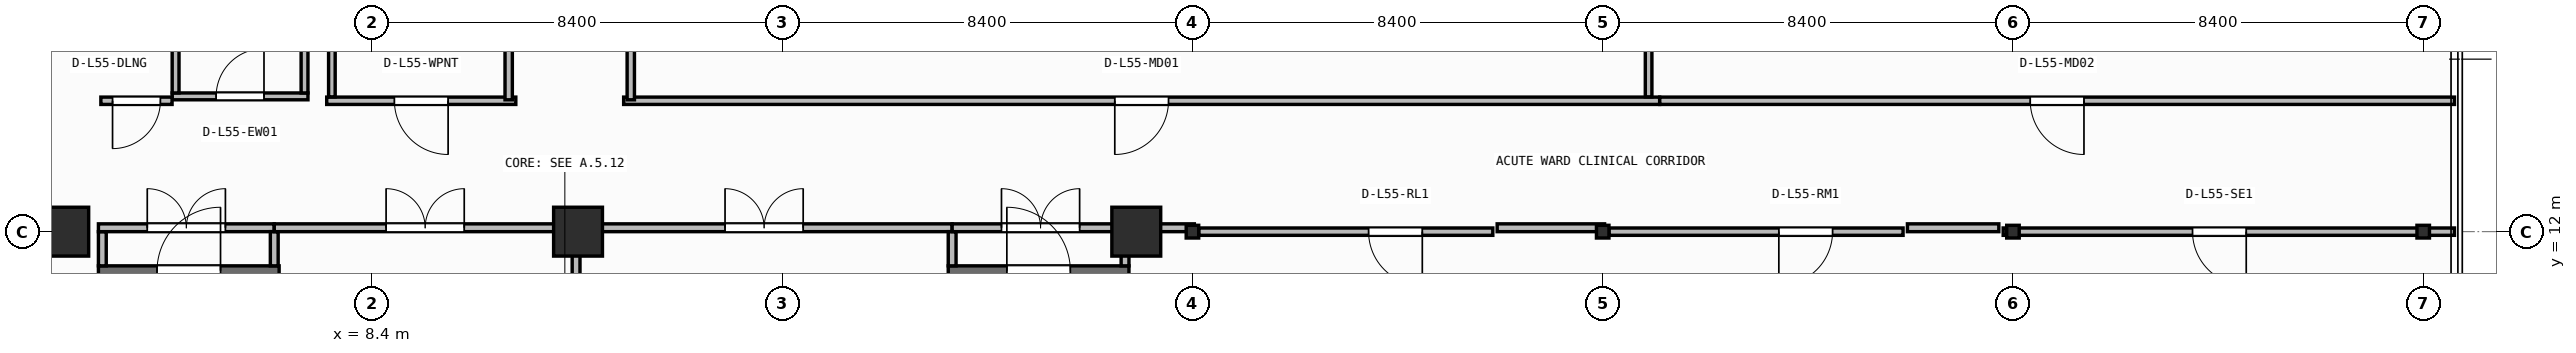
"""IFC4 building model, lengths in metres.
Left out: names, types, materials, properties, quantities, classifications, styles, units other than length and angle.
Written with IfcOpenShell. Run it as: python <this file> out.ifc"""

import sys

from ifc_helpers import new_model, si_unit, direction, frame, frame_2d, origin, origin_2d, place, context, subcontext, project, spatial, rectangle, i_section, extrude, element, fill, save


model = new_model("IFC4")
c1 = context("Model", 3, precision=1e-05, world=origin(), true_north=direction((0.0, 1.0)))
c2 = subcontext(c1, "Body", "Model", "MODEL_VIEW")
j1 = project(units=[si_unit("LENGTHUNIT", "METRE"), si_unit("PLANEANGLEUNIT", "RADIAN")], contexts=[c1])
p1 = place(None, origin())
s1 = spatial("IfcSite", under=j1, at=p1, CompositionType="ELEMENT")
p2 = place(p1, origin())
s2 = spatial("IfcBuilding", under=s1, at=p2, CompositionType="ELEMENT")
p3 = place(p2, frame((0.0, 0.0, 223.7)))
s3 = spatial("IfcBuildingStorey", under=s2, at=p3, CompositionType="ELEMENT", Elevation=223.7)
for number, where, z_axis, x_axis in (
    (1, (2.1, 12.0, 0.0), (0.0, 0.0, 1.0), (1.0, 0.0, 0.0)),
    (2, (12.62, 12.0, 0.0), (0.0, 0.0, 1.0), (1.0, 0.0, 0.0)),
    (3, (24.05, 12.0, 0.0), (0.0, 0.0, 1.0), (1.0, 0.0, 0.0)),
):
    element("IfcColumn", number, at=place(p3, frame(where, z_axis=z_axis, x_axis=x_axis)), inside=s3, PredefinedType="COLUMN", context=c2, shape_type="SweptSolid", body=[
        extrude(rectangle(XDim=1.0, YDim=1.0, at=origin_2d()), origin(), (0.0, 0.0, 1.0), 3.95),
    ])
for number, where, z_axis, x_axis in (
    (4, (25.2, 12.0, 0.0), (0.0, 0.0, 1.0), (1.0, 0.0, 0.0)),
    (5, (33.6, 12.0, 0.0), (0.0, 0.0, 1.0), (1.0, 0.0, 0.0)),
    (6, (42.0, 12.0, 0.0), (0.0, 0.0, 1.0), (1.0, 0.0, 0.0)),
    (7, (50.4, 12.0, 0.0), (0.0, 0.0, 1.0), (1.0, 0.0, 0.0)),
):
    element("IfcColumn", number, at=place(p3, frame(where, z_axis=z_axis, x_axis=x_axis)), inside=s3, PredefinedType="COLUMN", context=c2, shape_type="SweptSolid", body=[
        extrude(i_section(OverallWidth=0.256, OverallDepth=0.26, WebThickness=0.01, FlangeThickness=0.017, FilletRadius=0.013, at=origin_2d()), origin(), (0.0, 0.0, 1.0), 3.95),
    ])
p4 = place(p3, frame((2.8, 11.2, 0.0), z_axis=(0.0, 0.0, 1.0), x_axis=(1.0, 0.0, 0.0)))
e8 = element("IfcWall", 8, at=p4, inside=s3, PredefinedType="SHEAR", context=c2, shape_type="SweptSolid", body=[
    extrude(rectangle(XDim=3.7, YDim=0.2, at=frame_2d((1.85, 0.0))), origin(), (0.0, 0.0, 1.0), 3.71),
])
p5 = place(p4, frame((1.2, 0.0, 0.0)))
e9 = element("IfcOpeningElement", 9, at=p5, cuts=e8, PredefinedType="OPENING", context=c2, shape_type="SweptSolid", body=[
    extrude(rectangle(XDim=1.3, YDim=2.15, at=frame_2d((0.65, 1.075))), frame((0.0, 0.11, 0.0), z_axis=(0.0, -1.0, 0.0), x_axis=(1.0, 0.0, 0.0)), (0.0, 0.0, 1.0), 0.22),
])
p6 = place(p3, frame((20.2, 11.2, 0.0), z_axis=(0.0, 0.0, 1.0), x_axis=(1.0, 0.0, 0.0)))
e10 = element("IfcWall", 10, at=p6, inside=s3, PredefinedType="SHEAR", context=c2, shape_type="SweptSolid", body=[
    extrude(rectangle(XDim=3.7, YDim=0.2, at=frame_2d((1.85, 0.0))), origin(), (0.0, 0.0, 1.0), 3.71),
])
p7 = place(p6, frame((1.2, 0.0, 0.0)))
e11 = element("IfcOpeningElement", 11, at=p7, cuts=e10, PredefinedType="OPENING", context=c2, shape_type="SweptSolid", body=[
    extrude(rectangle(XDim=1.3, YDim=2.15, at=frame_2d((0.65, 1.075))), frame((0.0, 0.11, 0.0), z_axis=(0.0, -1.0, 0.0), x_axis=(1.0, 0.0, 0.0)), (0.0, 0.0, 1.0), 0.22),
])
p8 = place(p3, frame((2.88, 11.3, 0.0), z_axis=(0.0, 0.0, 1.0), x_axis=(0.0, 1.0, 0.0)))
e12 = element("IfcWall", 12, at=p8, inside=s3, PredefinedType="PARTITIONING", context=c2, shape_type="SweptSolid", body=[
    extrude(rectangle(XDim=0.7, YDim=0.16, at=frame_2d((0.35, 0.0))), origin(), (0.0, 0.0, 1.0), 3.71),
])
p9 = place(p3, frame((2.8, 12.08, 0.0), z_axis=(0.0, 0.0, 1.0), x_axis=(1.0, 0.0, 0.0)))
e13 = element("IfcWall", 13, at=p9, inside=s3, PredefinedType="PARTITIONING", context=c2, shape_type="SweptSolid", body=[
    extrude(rectangle(XDim=3.6, YDim=0.16, at=frame_2d((1.8, 0.0))), origin(), (0.0, 0.0, 1.0), 3.152),
])
p10 = place(p9, frame((1.0, 0.0, 0.0)))
e14 = element("IfcOpeningElement", 14, at=p10, cuts=e13, PredefinedType="OPENING", context=c2, shape_type="SweptSolid", body=[
    extrude(rectangle(XDim=1.6, YDim=2.05, at=frame_2d((0.8, 1.025))), frame((0.0, 0.09, 0.0), z_axis=(0.0, -1.0, 0.0), x_axis=(1.0, 0.0, 0.0)), (0.0, 0.0, 1.0), 0.18),
])
p11 = place(p3, frame((6.4, 11.3, 0.0), z_axis=(0.0, 0.0, 1.0), x_axis=(0.0, 1.0, 0.0)))
e15 = element("IfcWall", 15, at=p11, inside=s3, PredefinedType="PARTITIONING", context=c2, shape_type="SweptSolid", body=[
    extrude(rectangle(XDim=0.7, YDim=0.16, at=frame_2d((0.35, 0.0))), origin(), (0.0, 0.0, 1.0), 3.71),
])
p12 = place(p3, frame((6.4, 12.08, 0.0), z_axis=(0.0, 0.0, 1.0), x_axis=(1.0, 0.0, 0.0)))
e16 = element("IfcWall", 16, at=p12, inside=s3, PredefinedType="PARTITIONING", context=c2, shape_type="SweptSolid", body=[
    extrude(rectangle(XDim=6.18, YDim=0.16, at=frame_2d((3.09, 0.0))), origin(), (0.0, 0.0, 1.0), 3.152),
])
p13 = place(p12, frame((2.29, 0.0, 0.0)))
e17 = element("IfcOpeningElement", 17, at=p13, cuts=e16, PredefinedType="OPENING", context=c2, shape_type="SweptSolid", body=[
    extrude(rectangle(XDim=1.6, YDim=2.05, at=frame_2d((0.8, 1.025))), frame((0.0, 0.09, 0.0), z_axis=(0.0, -1.0, 0.0), x_axis=(1.0, 0.0, 0.0)), (0.0, 0.0, 1.0), 0.18),
])
p14 = place(p3, frame((12.58, 9.21, 0.0), z_axis=(0.0, 0.0, 1.0), x_axis=(0.0, 1.0, 0.0)))
e18 = element("IfcWall", 18, at=p14, inside=s3, PredefinedType="PARTITIONING", context=c2, shape_type="SweptSolid", body=[
    extrude(rectangle(XDim=2.79, YDim=0.16, at=frame_2d((1.395, 0.0))), origin(), (0.0, 0.0, 1.0), 3.71),
])
p15 = place(p3, frame((12.58, 12.08, 0.0), z_axis=(0.0, 0.0, 1.0), x_axis=(1.0, 0.0, 0.0)))
e19 = element("IfcWall", 19, at=p15, inside=s3, PredefinedType="PARTITIONING", context=c2, shape_type="SweptSolid", body=[
    extrude(rectangle(XDim=7.7, YDim=0.16, at=frame_2d((3.85, 0.0))), origin(), (0.0, 0.0, 1.0), 3.152),
])
p16 = place(p15, frame((3.05, 0.0, 0.0)))
e20 = element("IfcOpeningElement", 20, at=p16, cuts=e19, PredefinedType="OPENING", context=c2, shape_type="SweptSolid", body=[
    extrude(rectangle(XDim=1.6, YDim=2.05, at=frame_2d((0.8, 1.025))), frame((0.0, 0.09, 0.0), z_axis=(0.0, -1.0, 0.0), x_axis=(1.0, 0.0, 0.0)), (0.0, 0.0, 1.0), 0.18),
])
p17 = place(p3, frame((20.28, 11.3, 0.0), z_axis=(0.0, 0.0, 1.0), x_axis=(0.0, 1.0, 0.0)))
e21 = element("IfcWall", 21, at=p17, inside=s3, PredefinedType="PARTITIONING", context=c2, shape_type="SweptSolid", body=[
    extrude(rectangle(XDim=0.7, YDim=0.16, at=frame_2d((0.35, 0.0))), origin(), (0.0, 0.0, 1.0), 3.71),
])
p18 = place(p3, frame((20.28, 12.08, 0.0), z_axis=(0.0, 0.0, 1.0), x_axis=(1.0, 0.0, 0.0)))
e22 = element("IfcWall", 22, at=p18, inside=s3, PredefinedType="PARTITIONING", context=c2, shape_type="SweptSolid", body=[
    extrude(rectangle(XDim=3.62, YDim=0.16, at=frame_2d((1.81, 0.0))), origin(), (0.0, 0.0, 1.0), 3.152),
])
p19 = place(p18, frame((1.01, 0.0, 0.0)))
e23 = element("IfcOpeningElement", 23, at=p19, cuts=e22, PredefinedType="OPENING", context=c2, shape_type="SweptSolid", body=[
    extrude(rectangle(XDim=1.6, YDim=2.05, at=frame_2d((0.8, 1.025))), frame((0.0, 0.09, 0.0), z_axis=(0.0, -1.0, 0.0), x_axis=(1.0, 0.0, 0.0)), (0.0, 0.0, 1.0), 0.18),
])
p20 = place(p3, frame((23.82, 11.3, 0.0), z_axis=(0.0, 0.0, 1.0), x_axis=(0.0, 1.0, 0.0)))
e24 = element("IfcWall", 24, at=p20, inside=s3, PredefinedType="PARTITIONING", context=c2, shape_type="SweptSolid", body=[
    extrude(rectangle(XDim=0.7, YDim=0.16, at=frame_2d((0.35, 0.0))), origin(), (0.0, 0.0, 1.0), 3.71),
])
p21 = place(p3, frame((4.31, 14.77, 0.0), z_axis=(0.0, 0.0, 1.0), x_axis=(1.0, 0.0, 0.0)))
e25 = element("IfcWall", 25, at=p21, inside=s3, PredefinedType="PARTITIONING", context=c2, shape_type="SweptSolid", body=[
    extrude(rectangle(XDim=2.78, YDim=0.14, at=frame_2d((1.39, 0.0))), origin(), (0.0, 0.0, 1.0), 3.71),
])
p22 = place(p21, frame((0.9, 0.0, 0.0)))
e26 = element("IfcOpeningElement", 26, at=p22, cuts=e25, PredefinedType="OPENING", context=c2, shape_type="SweptSolid", body=[
    extrude(rectangle(XDim=0.98, YDim=2.1, at=frame_2d((0.49, 1.05))), frame((0.0, 0.08, 0.0), z_axis=(0.0, -1.0, 0.0), x_axis=(1.0, 0.0, 0.0)), (0.0, 0.0, 1.0), 0.16),
])
for number, where, z_axis, x_axis in (
    (27, (4.38, 14.84, 0.0), (0.0, 0.0, 1.0), (0.0, 1.0, 0.0)),
    (28, (7.02, 14.84, 0.0), (0.0, 0.0, 1.0), (0.0, 1.0, 0.0)),
):
    element("IfcWall", number, at=place(p3, frame(where, z_axis=z_axis, x_axis=x_axis)), inside=s3, PredefinedType="PARTITIONING", context=c2, shape_type="SweptSolid", body=[
        extrude(rectangle(XDim=2.2, YDim=0.14, at=frame_2d((1.1, 0.0))), origin(), (0.0, 0.0, 1.0), 3.71),
    ])
p23 = place(p3, frame((31.35, 12.0, 0.0), z_axis=(0.0, 0.0, 1.0), x_axis=(-1.0, 0.0, 0.0)))
e29 = element("IfcWall", 29, at=p23, inside=s3, PredefinedType="PARTITIONING", context=c2, shape_type="SweptSolid", body=[
    extrude(rectangle(XDim=6.022, YDim=0.15, at=frame_2d((3.011, 0.0))), origin(), (0.0, 0.0, 1.0), 3.152),
])
p24 = place(p23, frame((1.444, 0.0, 0.0)))
e30 = element("IfcOpeningElement", 30, at=p24, cuts=e29, PredefinedType="OPENING", context=c2, shape_type="SweptSolid", body=[
    extrude(rectangle(XDim=1.1, YDim=2.1, at=frame_2d((0.55, 1.05))), frame((0.0, 0.085, 0.0), z_axis=(0.0, -1.0, 0.0), x_axis=(1.0, 0.0, 0.0)), (0.0, 0.0, 1.0), 0.17),
])
p25 = place(p3, frame((39.75, 12.0, 0.0), z_axis=(0.0, 0.0, 1.0), x_axis=(-1.0, 0.0, 0.0)))
e31 = element("IfcWall", 31, at=p25, inside=s3, PredefinedType="PARTITIONING", context=c2, shape_type="SweptSolid", body=[
    extrude(rectangle(XDim=6.022, YDim=0.15, at=frame_2d((3.011, 0.0))), origin(), (0.0, 0.0, 1.0), 3.152),
])
p26 = place(p25, frame((1.444, 0.0, 0.0)))
e32 = element("IfcOpeningElement", 32, at=p26, cuts=e31, PredefinedType="OPENING", context=c2, shape_type="SweptSolid", body=[
    extrude(rectangle(XDim=1.1, YDim=2.1, at=frame_2d((0.55, 1.05))), frame((0.0, 0.085, 0.0), z_axis=(0.0, -1.0, 0.0), x_axis=(1.0, 0.0, 0.0)), (0.0, 0.0, 1.0), 0.17),
])
p27 = place(p3, frame((51.04, 12.0, 0.0), z_axis=(0.0, 0.0, 1.0), x_axis=(-1.0, 0.0, 0.0)))
e33 = element("IfcWall", 33, at=p27, inside=s3, PredefinedType="PARTITIONING", context=c2, shape_type="SweptSolid", body=[
    extrude(rectangle(XDim=9.24, YDim=0.15, at=frame_2d((4.62, 0.0))), origin(), (0.0, 0.0, 1.0), 3.152),
])
p28 = place(p27, frame((4.263, 0.0, 0.0)))
e34 = element("IfcOpeningElement", 34, at=p28, cuts=e33, PredefinedType="OPENING", context=c2, shape_type="SweptSolid", body=[
    extrude(rectangle(XDim=1.1, YDim=2.1, at=frame_2d((0.55, 1.05))), frame((0.0, 0.085, 0.0), z_axis=(0.0, -1.0, 0.0), x_axis=(1.0, 0.0, 0.0)), (0.0, 0.0, 1.0), 0.17),
])
p29 = place(p3, frame((4.308, 14.68, 0.0), z_axis=(0.0, 0.0, 1.0), x_axis=(-1.0, 0.0, 0.0)))
e35 = element("IfcWall", 35, at=p29, inside=s3, PredefinedType="PARTITIONING", context=c2, shape_type="SweptSolid", body=[
    extrude(rectangle(XDim=1.458, YDim=0.15, at=frame_2d((0.729, 0.0))), origin(), (0.0, 0.0, 1.0), 3.71),
])
p30 = place(p29, frame((0.239, 0.0, 0.0)))
e36 = element("IfcOpeningElement", 36, at=p30, cuts=e35, PredefinedType="OPENING", context=c2, shape_type="SweptSolid", body=[
    extrude(rectangle(XDim=0.98, YDim=2.1, at=frame_2d((0.49, 1.05))), frame((0.0, 0.085, 0.0), z_axis=(0.0, -1.0, 0.0), x_axis=(1.0, 0.0, 0.0)), (0.0, 0.0, 1.0), 0.17),
])
p31 = place(p3, frame((11.346, 14.68, 0.0), z_axis=(0.0, 0.0, 1.0), x_axis=(-1.0, 0.0, 0.0)))
e37 = element("IfcWall", 37, at=p31, inside=s3, PredefinedType="PARTITIONING", context=c2, shape_type="SweptSolid", body=[
    extrude(rectangle(XDim=3.872, YDim=0.15, at=frame_2d((1.936, 0.0))), origin(), (0.0, 0.0, 1.0), 3.71),
])
p32 = place(p31, frame((1.386, 0.0, 0.0)))
e38 = element("IfcOpeningElement", 38, at=p32, cuts=e37, PredefinedType="OPENING", context=c2, shape_type="SweptSolid", body=[
    extrude(rectangle(XDim=1.1, YDim=2.1, at=frame_2d((0.55, 1.05))), frame((0.0, 0.085, 0.0), z_axis=(0.0, -1.0, 0.0), x_axis=(1.0, 0.0, 0.0)), (0.0, 0.0, 1.0), 0.17),
])
p33 = place(p3, frame((34.766, 14.68, 0.0), z_axis=(0.0, 0.0, 1.0), x_axis=(-1.0, 0.0, 0.0)))
e39 = element("IfcWall", 39, at=p33, inside=s3, PredefinedType="PARTITIONING", context=c2, shape_type="SweptSolid", body=[
    extrude(rectangle(XDim=21.212, YDim=0.15, at=frame_2d((10.606, 0.0))), origin(), (0.0, 0.0, 1.0), 3.71),
])
p34 = place(p33, frame((10.056, 0.0, 0.0)))
e40 = element("IfcOpeningElement", 40, at=p34, cuts=e39, PredefinedType="OPENING", context=c2, shape_type="SweptSolid", body=[
    extrude(rectangle(XDim=1.1, YDim=2.1, at=frame_2d((0.55, 1.05))), frame((0.0, 0.085, 0.0), z_axis=(0.0, -1.0, 0.0), x_axis=(1.0, 0.0, 0.0)), (0.0, 0.0, 1.0), 0.17),
])
p35 = place(p3, frame((51.04, 14.68, 0.0), z_axis=(0.0, 0.0, 1.0), x_axis=(-1.0, 0.0, 0.0)))
e41 = element("IfcWall", 41, at=p35, inside=s3, PredefinedType="PARTITIONING", context=c2, shape_type="SweptSolid", body=[
    extrude(rectangle(XDim=16.272, YDim=0.15, at=frame_2d((8.136, 0.0))), origin(), (0.0, 0.0, 1.0), 3.71),
])
p36 = place(p35, frame((7.586, 0.0, 0.0)))
e42 = element("IfcOpeningElement", 42, at=p36, cuts=e41, PredefinedType="OPENING", context=c2, shape_type="SweptSolid", body=[
    extrude(rectangle(XDim=1.1, YDim=2.1, at=frame_2d((0.55, 1.05))), frame((0.0, 0.085, 0.0), z_axis=(0.0, -1.0, 0.0), x_axis=(1.0, 0.0, 0.0)), (0.0, 0.0, 1.0), 0.17),
])
p37 = place(p3, frame((11.2, 26.6, 0.0), z_axis=(0.0, 0.0, 1.0), x_axis=(0.0, -1.0, 0.0)))
e43 = element("IfcWall", 43, at=p37, inside=s3, PredefinedType="PARTITIONING", context=c2, shape_type="SweptSolid", body=[
    extrude(rectangle(XDim=11.9, YDim=0.15, at=frame_2d((5.95, 0.0))), origin(), (0.0, 0.0, 1.0), 3.71),
])
p38 = place(p3, frame((13.7, 14.7, 0.0), z_axis=(0.0, 0.0, 1.0), x_axis=(0.0, 1.0, 0.0)))
e44 = element("IfcWall", 44, at=p38, inside=s3, PredefinedType="PARTITIONING", context=c2, shape_type="SweptSolid", body=[
    extrude(rectangle(XDim=5.326, YDim=0.15, at=frame_2d((2.663, 0.0))), origin(), (0.0, 0.0, 1.0), 3.71),
])
p39 = place(p3, frame((7.58, 14.76, 0.0), z_axis=(0.0, 0.0, 1.0), x_axis=(0.0, 1.0, 0.0)))
e45 = element("IfcWall", 45, at=p39, inside=s3, PredefinedType="PARTITIONING", context=c2, shape_type="SweptSolid", body=[
    extrude(rectangle(XDim=11.76, YDim=0.135, at=frame_2d((5.88, 0.0))), origin(), (0.0, 0.0, 1.0), 3.71),
])
p40 = place(p3, frame((34.54, 14.76, 0.0), z_axis=(0.0, 0.0, 1.0), x_axis=(0.0, 1.0, 0.0)))
e46 = element("IfcWall", 46, at=p40, inside=s3, PredefinedType="PARTITIONING", context=c2, shape_type="SweptSolid", body=[
    extrude(rectangle(XDim=5.04, YDim=0.135, at=frame_2d((2.52, 0.0))), origin(), (0.0, 0.0, 1.0), 3.71),
])
p41 = place(p3, frame((24.02, 12.08, 0.0), z_axis=(0.0, 0.0, 1.0), x_axis=(1.0, 0.0, 0.0)))
e47 = element("IfcWall", 47, at=p41, inside=s3, PredefinedType="PARTITIONING", context=c2, shape_type="SweptSolid", body=[
    extrude(rectangle(XDim=1.219, YDim=0.16, at=frame_2d((0.609, 0.0))), origin(), (0.0, 0.0, 1.0), 3.152),
])
p42 = place(p3, frame((31.439, 12.08, 0.0), z_axis=(0.0, 0.0, 1.0), x_axis=(1.0, 0.0, 0.0)))
e48 = element("IfcWall", 48, at=p42, inside=s3, PredefinedType="PARTITIONING", context=c2, shape_type="SweptSolid", body=[
    extrude(rectangle(XDim=2.199, YDim=0.16, at=frame_2d((1.1, 0.0))), origin(), (0.0, 0.0, 1.0), 3.152),
])
p43 = place(p3, frame((39.839, 12.08, 0.0), z_axis=(0.0, 0.0, 1.0), x_axis=(1.0, 0.0, 0.0)))
e49 = element("IfcWall", 49, at=p43, inside=s3, PredefinedType="PARTITIONING", context=c2, shape_type="SweptSolid", body=[
    extrude(rectangle(XDim=1.871, YDim=0.16, at=frame_2d((0.936, 0.0))), origin(), (0.0, 0.0, 1.0), 3.152),
])
p44 = place(p5, origin())
e50 = element("IfcDoor", 50, at=p44, inside=s3, OperationType="SINGLE_SWING_RIGHT", PredefinedType="DOOR", context=c2, shape_type="SweptSolid", body=[
    extrude(rectangle(XDim=1.3, YDim=2.15, at=frame_2d((0.65, 1.075))), frame((0.0, 0.025, 0.0), z_axis=(0.0, -1.0, 0.0), x_axis=(1.0, 0.0, 0.0)), (0.0, 0.0, 1.0), 0.05),
])
fill(e9, e50)
p45 = place(p7, origin())
e51 = element("IfcDoor", 51, at=p45, inside=s3, OperationType="SINGLE_SWING_LEFT", PredefinedType="DOOR", context=c2, shape_type="SweptSolid", body=[
    extrude(rectangle(XDim=1.3, YDim=2.15, at=frame_2d((0.65, 1.075))), frame((0.0, 0.025, 0.0), z_axis=(0.0, -1.0, 0.0), x_axis=(1.0, 0.0, 0.0)), (0.0, 0.0, 1.0), 0.05),
])
fill(e11, e51)
p46 = place(p10, origin())
e52 = element("IfcDoor", 52, at=p46, inside=s3, OperationType="DOUBLE_DOOR_SINGLE_SWING", PredefinedType="DOOR", context=c2, shape_type="SweptSolid", body=[
    extrude(rectangle(XDim=1.6, YDim=2.05, at=frame_2d((0.8, 1.025))), frame((0.0, 0.025, 0.0), z_axis=(0.0, -1.0, 0.0), x_axis=(1.0, 0.0, 0.0)), (0.0, 0.0, 1.0), 0.05),
])
fill(e14, e52)
p47 = place(p13, origin())
e53 = element("IfcDoor", 53, at=p47, inside=s3, OperationType="DOUBLE_DOOR_SINGLE_SWING", PredefinedType="DOOR", context=c2, shape_type="SweptSolid", body=[
    extrude(rectangle(XDim=1.6, YDim=2.05, at=frame_2d((0.8, 1.025))), frame((0.0, 0.025, 0.0), z_axis=(0.0, -1.0, 0.0), x_axis=(1.0, 0.0, 0.0)), (0.0, 0.0, 1.0), 0.05),
])
fill(e17, e53)
p48 = place(p16, origin())
e54 = element("IfcDoor", 54, at=p48, inside=s3, OperationType="DOUBLE_DOOR_SINGLE_SWING", PredefinedType="DOOR", context=c2, shape_type="SweptSolid", body=[
    extrude(rectangle(XDim=1.6, YDim=2.05, at=frame_2d((0.8, 1.025))), frame((0.0, 0.025, 0.0), z_axis=(0.0, -1.0, 0.0), x_axis=(1.0, 0.0, 0.0)), (0.0, 0.0, 1.0), 0.05),
])
fill(e20, e54)
p49 = place(p19, origin())
e55 = element("IfcDoor", 55, at=p49, inside=s3, OperationType="DOUBLE_DOOR_SINGLE_SWING", PredefinedType="DOOR", context=c2, shape_type="SweptSolid", body=[
    extrude(rectangle(XDim=1.6, YDim=2.05, at=frame_2d((0.8, 1.025))), frame((0.0, 0.025, 0.0), z_axis=(0.0, -1.0, 0.0), x_axis=(1.0, 0.0, 0.0)), (0.0, 0.0, 1.0), 0.05),
])
fill(e23, e55)
p50 = place(p22, origin())
e56 = element("IfcDoor", 56, at=p50, inside=s3, OperationType="SINGLE_SWING_RIGHT", PredefinedType="DOOR", context=c2, shape_type="SweptSolid", body=[
    extrude(rectangle(XDim=0.98, YDim=2.1, at=frame_2d((0.49, 1.05))), frame((0.0, 0.025, 0.0), z_axis=(0.0, -1.0, 0.0), x_axis=(1.0, 0.0, 0.0)), (0.0, 0.0, 1.0), 0.05),
])
fill(e26, e56)
p51 = place(p24, origin())
e57 = element("IfcDoor", 57, at=p51, inside=s3, OperationType="SINGLE_SWING_LEFT", PredefinedType="DOOR", context=c2, shape_type="SweptSolid", body=[
    extrude(rectangle(XDim=1.1, YDim=2.1, at=frame_2d((0.55, 1.05))), frame((0.0, 0.025, 0.0), z_axis=(0.0, -1.0, 0.0), x_axis=(1.0, 0.0, 0.0)), (0.0, 0.0, 1.0), 0.05),
])
fill(e30, e57)
p52 = place(p26, origin())
e58 = element("IfcDoor", 58, at=p52, inside=s3, OperationType="SINGLE_SWING_RIGHT", PredefinedType="DOOR", context=c2, shape_type="SweptSolid", body=[
    extrude(rectangle(XDim=1.1, YDim=2.1, at=frame_2d((0.55, 1.05))), frame((0.0, 0.025, 0.0), z_axis=(0.0, -1.0, 0.0), x_axis=(1.0, 0.0, 0.0)), (0.0, 0.0, 1.0), 0.05),
])
fill(e32, e58)
p53 = place(p28, origin())
e59 = element("IfcDoor", 59, at=p53, inside=s3, OperationType="SINGLE_SWING_LEFT", PredefinedType="DOOR", context=c2, shape_type="SweptSolid", body=[
    extrude(rectangle(XDim=1.1, YDim=2.1, at=frame_2d((0.55, 1.05))), frame((0.0, 0.025, 0.0), z_axis=(0.0, -1.0, 0.0), x_axis=(1.0, 0.0, 0.0)), (0.0, 0.0, 1.0), 0.05),
])
fill(e34, e59)
p54 = place(p30, origin())
e60 = element("IfcDoor", 60, at=p54, inside=s3, OperationType="SINGLE_SWING_RIGHT", PredefinedType="DOOR", context=c2, shape_type="SweptSolid", body=[
    extrude(rectangle(XDim=0.98, YDim=2.1, at=frame_2d((0.49, 1.05))), frame((0.0, 0.025, 0.0), z_axis=(0.0, -1.0, 0.0), x_axis=(1.0, 0.0, 0.0)), (0.0, 0.0, 1.0), 0.05),
])
fill(e36, e60)
p55 = place(p32, origin())
e61 = element("IfcDoor", 61, at=p55, inside=s3, OperationType="SINGLE_SWING_LEFT", PredefinedType="DOOR", context=c2, shape_type="SweptSolid", body=[
    extrude(rectangle(XDim=1.1, YDim=2.1, at=frame_2d((0.55, 1.05))), frame((0.0, 0.025, 0.0), z_axis=(0.0, -1.0, 0.0), x_axis=(1.0, 0.0, 0.0)), (0.0, 0.0, 1.0), 0.05),
])
fill(e38, e61)
p56 = place(p34, origin())
e62 = element("IfcDoor", 62, at=p56, inside=s3, OperationType="SINGLE_SWING_RIGHT", PredefinedType="DOOR", context=c2, shape_type="SweptSolid", body=[
    extrude(rectangle(XDim=1.1, YDim=2.1, at=frame_2d((0.55, 1.05))), frame((0.0, 0.025, 0.0), z_axis=(0.0, -1.0, 0.0), x_axis=(1.0, 0.0, 0.0)), (0.0, 0.0, 1.0), 0.05),
])
fill(e40, e62)
p57 = place(p36, origin())
e63 = element("IfcDoor", 63, at=p57, inside=s3, OperationType="SINGLE_SWING_LEFT", PredefinedType="DOOR", context=c2, shape_type="SweptSolid", body=[
    extrude(rectangle(XDim=1.1, YDim=2.1, at=frame_2d((0.55, 1.05))), frame((0.0, 0.025, 0.0), z_axis=(0.0, -1.0, 0.0), x_axis=(1.0, 0.0, 0.0)), (0.0, 0.0, 1.0), 0.05),
])
fill(e42, e63)
save(model, sys.argv[1])
